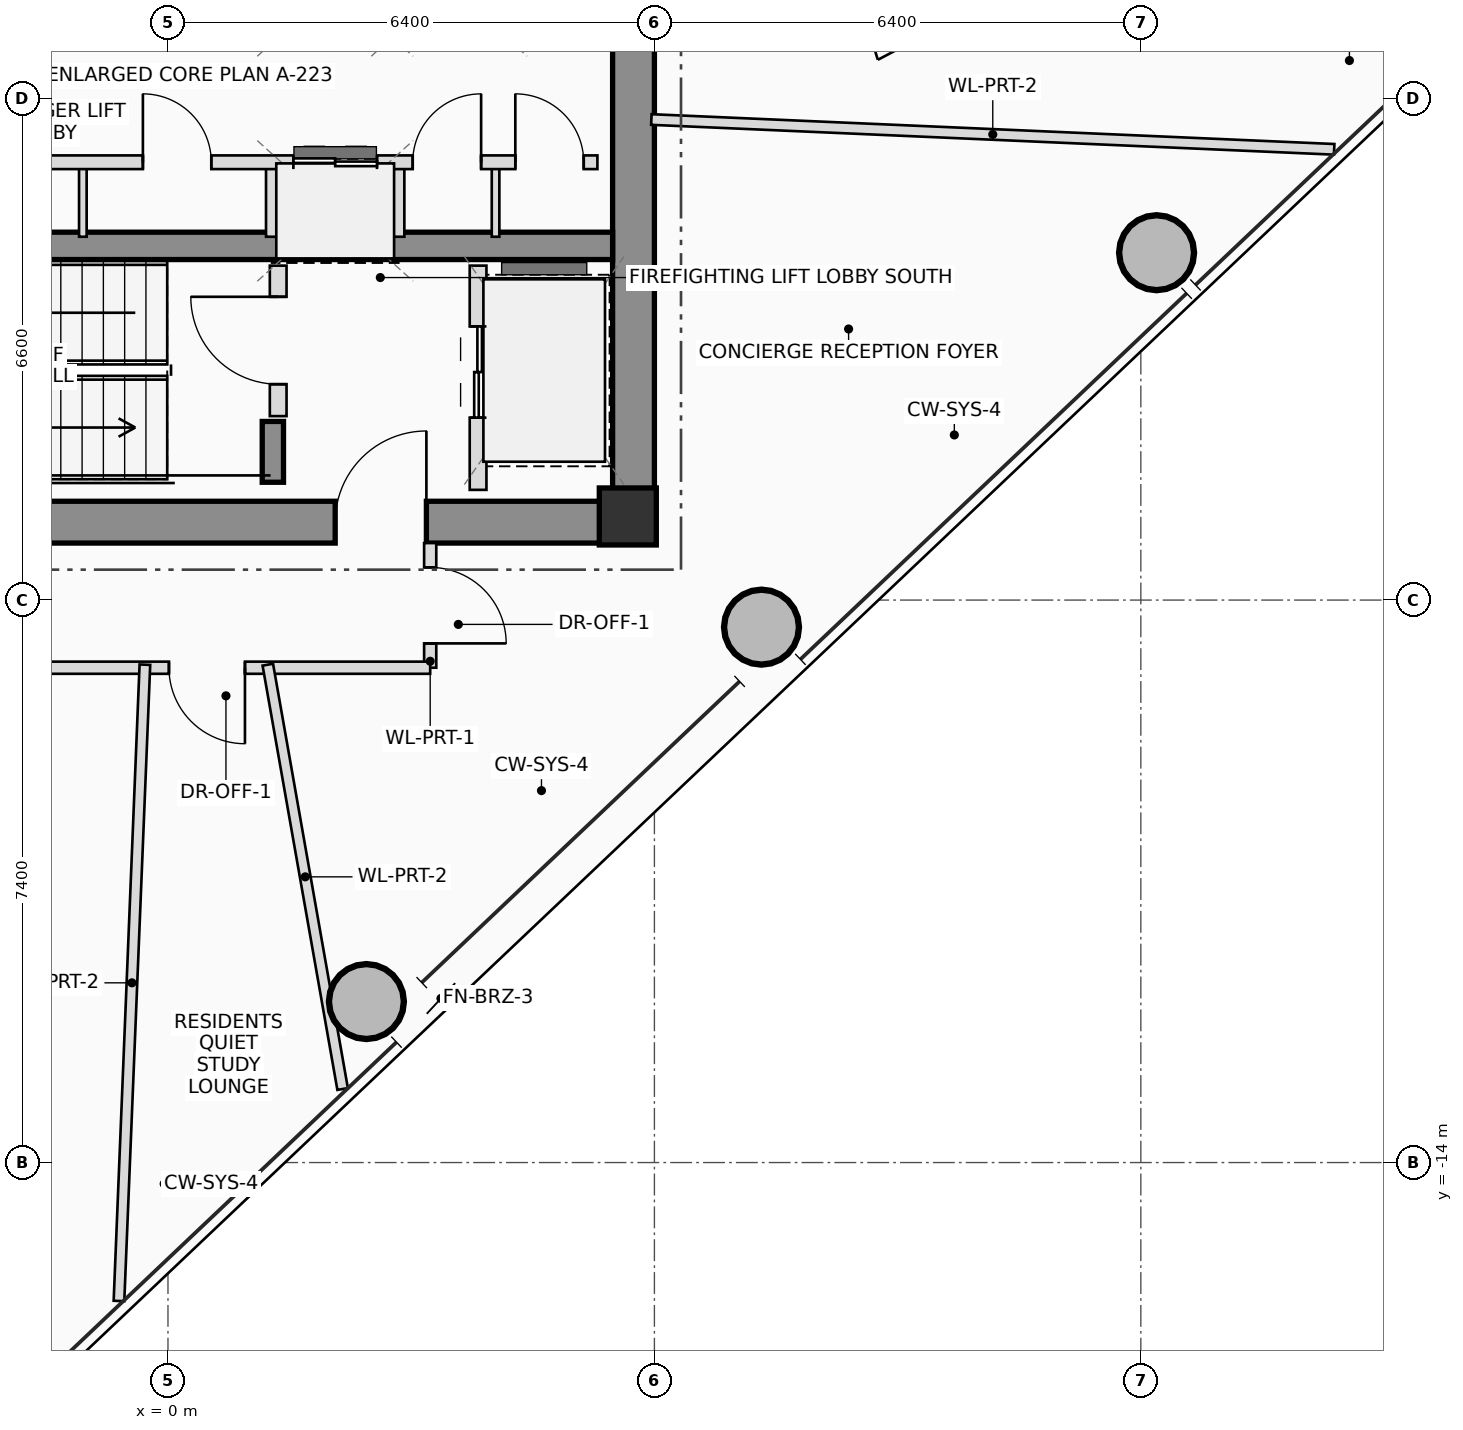
"""IFC4 building model, lengths in metres.
Left out: names, types, materials, properties, quantities, classifications, styles, units other than length and angle.
Written with IfcOpenShell. Run it as: python <this file> out.ifc"""

import sys

from ifc_helpers import new_model, si_unit, direction, frame, frame_2d, origin, origin_2d, place, context, subcontext, project, spatial, rectangle, hollow_circle, extrude, source, transform, mapped, element, fill, save


model = new_model("IFC4")
c1 = context("Model", 3, precision=1e-05, world=origin(), true_north=direction((0.0, 1.0)))
c2 = subcontext(c1, "Body", "Model", "MODEL_VIEW")
j1 = project(units=[si_unit("LENGTHUNIT", "METRE"), si_unit("PLANEANGLEUNIT", "RADIAN")], contexts=[c1])
p1 = place(None, origin())
s1 = spatial("IfcSite", under=j1, at=p1, CompositionType="ELEMENT")
p2 = place(p1, origin())
s2 = spatial("IfcBuilding", under=s1, at=p2, CompositionType="ELEMENT")
p3 = place(p2, frame((0.0, 0.0, 245.65)))
s3 = spatial("IfcBuildingStorey", under=s2, at=p3, CompositionType="ELEMENT", Elevation=245.65)
m1 = source(origin(), c2, "Body", "SweptSolid", [
    extrude(rectangle(XDim=0.75, YDim=0.75, at=origin_2d()), origin(), (0.0, 0.0, 1.0), 3.4),
])
p4 = place(p3, frame((6.05, -5.5, 0.0), z_axis=(0.0, 0.0, 1.0), x_axis=(1.0, 0.0, 0.0)))
e1 = element("IfcColumn", 1, at=p4, inside=s3, PredefinedType="COLUMN", context=c2, shape_type="MappedRepresentation", body=[
    mapped(m1, transform((0.0, 0.0, 0.0), scale=1.0)),
])
p5 = place(p3, frame((-6.4, -5.575, 0.0), z_axis=(0.0, 0.0, 1.0), x_axis=(1.0, 0.0, 0.0)))
e2 = element("IfcWall", 2, at=p5, inside=s3, PredefinedType="SHEAR", context=c2, shape_type="SweptSolid", body=[
    extrude(rectangle(XDim=12.8, YDim=0.55, at=frame_2d((6.4, 0.0))), origin(), (0.0, 0.0, 1.0), 3.4),
])
p6 = place(p5, frame((8.6, 0.0, 0.0)))
e3 = element("IfcOpeningElement", 3, at=p6, cuts=e2, PredefinedType="OPENING", context=c2, shape_type="SweptSolid", body=[
    extrude(rectangle(XDim=1.2, YDim=2.2, at=frame_2d((0.6, 1.1))), frame((0.0, 0.285, 0.0), z_axis=(0.0, -1.0, 0.0), x_axis=(1.0, 0.0, 0.0)), (0.0, 0.0, 1.0), 0.57),
])
p7 = place(p3, frame((6.125, -5.3, 0.0), z_axis=(0.0, 0.0, 1.0), x_axis=(0.0, 1.0, 0.0)))
e4 = element("IfcWall", 4, at=p7, inside=s3, PredefinedType="SHEAR", context=c2, shape_type="SweptSolid", body=[
    extrude(rectangle(XDim=10.6, YDim=0.55, at=frame_2d((5.3, 0.0))), origin(), (0.0, 0.0, 1.0), 3.4),
])
p8 = place(p3, frame((-5.85, -1.94, 0.0), z_axis=(0.0, 0.0, 1.0), x_axis=(1.0, 0.0, 0.0)))
e5 = element("IfcWall", 5, at=p8, inside=s3, PredefinedType="SHEAR", context=c2, shape_type="SweptSolid", body=[
    extrude(rectangle(XDim=11.7, YDim=0.36, at=frame_2d((5.85, 0.0))), origin(), (0.0, 0.0, 1.0), 3.4),
])
p9 = place(p3, frame((1.38, -5.05, 0.0), z_axis=(0.0, 0.0, 1.0), x_axis=(0.0, 1.0, 0.0)))
e6 = element("IfcWall", 6, at=p9, inside=s3, PredefinedType="SHEAR", context=c2, shape_type="SweptSolid", body=[
    extrude(rectangle(XDim=0.8, YDim=0.28, at=frame_2d((0.4, 0.0))), origin(), (0.0, 0.0, 1.0), 3.4),
])
m2 = source(origin(), c2, "Body", "SweptSolid", [
    extrude(hollow_circle(Radius=0.5, WallThickness=0.04, at=origin_2d()), origin(), (0.0, 0.0, 1.0), 3.4),
])
for number, where, z_axis, x_axis in (
    (7, (2.611, -11.882, 0.0), (0.0, 0.0, 1.0), (1.0, 0.0, 0.0)),
    (8, (7.809, -6.956, 0.0), (0.0, 0.0, 1.0), (1.0, 0.0, 0.0)),
    (9, (13.007, -2.03, 0.0), (0.0, 0.0, 1.0), (1.0, 0.0, 0.0)),
):
    element("IfcColumn", number, at=place(p3, frame(where, z_axis=z_axis, x_axis=x_axis)), inside=s3, PredefinedType="COLUMN", context=c2, shape_type="MappedRepresentation", body=[
        mapped(m2, transform((0.0, 0.0, 0.0), scale=1.0)),
    ])
p10 = place(p3, frame((1.45, -4.18, 0.0), z_axis=(0.0, 0.0, 1.0), x_axis=(0.0, 1.0, 0.0)))
e10 = element("IfcWall", 10, at=p10, inside=s3, PredefinedType="PLUMBINGWALL", context=c2, shape_type="SweptSolid", body=[
    extrude(rectangle(XDim=1.98, YDim=0.22, at=frame_2d((0.99, 0.0))), origin(), (0.0, 0.0, 1.0), 3.2),
])
p11 = place(p10, frame((0.42, 0.0, 0.0)))
e11 = element("IfcOpeningElement", 11, at=p11, cuts=e10, PredefinedType="OPENING", context=c2, shape_type="SweptSolid", body=[
    extrude(rectangle(XDim=1.15, YDim=2.15, at=frame_2d((0.575, 1.075))), frame((0.0, 0.12, 0.0), z_axis=(0.0, -1.0, 0.0), x_axis=(1.0, 0.0, 0.0)), (0.0, 0.0, 1.0), 0.24),
])
p12 = place(p3, frame((4.08, -5.15, 0.0), z_axis=(0.0, 0.0, 1.0), x_axis=(0.0, 1.0, 0.0)))
e12 = element("IfcWall", 12, at=p12, inside=s3, PredefinedType="PLUMBINGWALL", context=c2, shape_type="SweptSolid", body=[
    extrude(rectangle(XDim=2.95, YDim=0.22, at=frame_2d((1.475, 0.0))), origin(), (0.0, 0.0, 1.0), 3.2),
])
p13 = place(p12, frame((0.95, 0.0, 0.0)))
e13 = element("IfcOpeningElement", 13, at=p13, cuts=e12, PredefinedType="OPENING", context=c2, shape_type="SweptSolid", body=[
    extrude(rectangle(XDim=1.2, YDim=2.25, at=frame_2d((0.6, 1.125))), frame((0.0, 0.12, 0.0), z_axis=(0.0, -1.0, 0.0), x_axis=(1.0, 0.0, 0.0)), (0.0, 0.0, 1.0), 0.24),
])
p14 = place(p3, frame((-1.12, -1.82, 0.0), z_axis=(0.0, 0.0, 1.0), x_axis=(0.0, 1.0, 0.0)))
e14 = element("IfcWall", 14, at=p14, inside=s3, PredefinedType="PARTITIONING", context=c2, shape_type="SweptSolid", body=[
    extrude(rectangle(XDim=0.98, YDim=0.1, at=frame_2d((0.49, 0.0))), origin(), (0.0, 0.0, 1.0), 3.2),
])
for number, where, z_axis, x_axis in (
    (15, (1.38, -1.82, 0.0), (0.0, 0.0, 1.0), (0.0, 1.0, 0.0)),
    (16, (3.02, -1.82, 0.0), (0.0, 0.0, 1.0), (0.0, 1.0, 0.0)),
):
    element("IfcWall", number, at=place(p3, frame(where, z_axis=z_axis, x_axis=x_axis)), inside=s3, PredefinedType="PLUMBINGWALL", context=c2, shape_type="SweptSolid", body=[
        extrude(rectangle(XDim=0.98, YDim=0.18, at=frame_2d((0.49, 0.0))), origin(), (0.0, 0.0, 1.0), 3.2),
    ])
p15 = place(p3, frame((4.31, -1.82, 0.0), z_axis=(0.0, 0.0, 1.0), x_axis=(0.0, 1.0, 0.0)))
e17 = element("IfcWall", 17, at=p15, inside=s3, PredefinedType="PARTITIONING", context=c2, shape_type="SweptSolid", body=[
    extrude(rectangle(XDim=0.98, YDim=0.1, at=frame_2d((0.49, 0.0))), origin(), (0.0, 0.0, 1.0), 3.2),
])
p16 = place(p3, frame((-5.68, -0.84, 0.0), z_axis=(0.0, 0.0, 1.0), x_axis=(1.0, 0.0, 0.0)))
e18 = element("IfcWall", 18, at=p16, inside=s3, PredefinedType="PLUMBINGWALL", context=c2, shape_type="SweptSolid", body=[
    extrude(rectangle(XDim=11.33, YDim=0.18, at=frame_2d((5.665, 0.0))), origin(), (0.0, 0.0, 1.0), 3.2),
])
p17 = place(p16, frame((1.88, 0.0, 0.0)))
e19 = element("IfcOpeningElement", 19, at=p17, cuts=e18, PredefinedType="OPENING", context=c2, shape_type="SweptSolid", body=[
    extrude(rectangle(XDim=0.9, YDim=2.05, at=frame_2d((0.45, 1.025))), frame((0.0, 0.1, 0.0), z_axis=(0.0, -1.0, 0.0), x_axis=(1.0, 0.0, 0.0)), (0.0, 0.0, 1.0), 0.2),
])
p18 = place(p16, frame((5.35, 0.0, 0.0)))
e20 = element("IfcOpeningElement", 20, at=p18, cuts=e18, PredefinedType="OPENING", context=c2, shape_type="SweptSolid", body=[
    extrude(rectangle(XDim=0.9, YDim=2.05, at=frame_2d((0.45, 1.025))), frame((0.0, 0.1, 0.0), z_axis=(0.0, -1.0, 0.0), x_axis=(1.0, 0.0, 0.0)), (0.0, 0.0, 1.0), 0.2),
])
p19 = place(p16, frame((7.33, 0.0, 0.0)))
e21 = element("IfcOpeningElement", 21, at=p19, cuts=e18, PredefinedType="OPENING", context=c2, shape_type="SweptSolid", body=[
    extrude(rectangle(XDim=1.1, YDim=2.2, at=frame_2d((0.55, 1.1))), frame((0.0, 0.1, 0.0), z_axis=(0.0, -1.0, 0.0), x_axis=(1.0, 0.0, 0.0)), (0.0, 0.0, 1.0), 0.2),
])
p20 = place(p16, frame((8.9, 0.0, 0.0)))
e22 = element("IfcOpeningElement", 22, at=p20, cuts=e18, PredefinedType="OPENING", context=c2, shape_type="SweptSolid", body=[
    extrude(rectangle(XDim=0.9, YDim=2.05, at=frame_2d((0.45, 1.025))), frame((0.0, 0.1, 0.0), z_axis=(0.0, -1.0, 0.0), x_axis=(1.0, 0.0, 0.0)), (0.0, 0.0, 1.0), 0.2),
])
p21 = place(p16, frame((10.25, 0.0, 0.0)))
e23 = element("IfcOpeningElement", 23, at=p21, cuts=e18, PredefinedType="OPENING", context=c2, shape_type="SweptSolid", body=[
    extrude(rectangle(XDim=0.9, YDim=2.05, at=frame_2d((0.45, 1.025))), frame((0.0, 0.1, 0.0), z_axis=(0.0, -1.0, 0.0), x_axis=(1.0, 0.0, 0.0)), (0.0, 0.0, 1.0), 0.2),
])
p22 = place(p3, frame((3.45, -5.85, 0.0), z_axis=(0.0, 0.0, 1.0), x_axis=(0.0, -1.0, 0.0)))
e24 = element("IfcWall", 24, at=p22, inside=s3, PredefinedType="PARTITIONING", context=c2, shape_type="SweptSolid", body=[
    extrude(rectangle(XDim=1.64, YDim=0.16, at=frame_2d((0.82, 0.0))), origin(), (0.0, 0.0, 1.0), 3.2),
])
p23 = place(p22, frame((0.32, 0.0, 0.0)))
e25 = element("IfcOpeningElement", 25, at=p23, cuts=e24, PredefinedType="OPENING", context=c2, shape_type="SweptSolid", body=[
    extrude(rectangle(XDim=1.0, YDim=2.25, at=frame_2d((0.5, 1.125))), frame((0.0, 0.09, 0.0), z_axis=(0.0, -1.0, 0.0), x_axis=(1.0, 0.0, 0.0)), (0.0, 0.0, 1.0), 0.18),
])
p24 = place(p3, frame((3.45, -7.49, 0.0), z_axis=(0.0, 0.0, 1.0), x_axis=(-1.0, 0.0, 0.0)))
e26 = element("IfcWall", 26, at=p24, inside=s3, PredefinedType="PARTITIONING", context=c2, shape_type="SweptSolid", body=[
    extrude(rectangle(XDim=9.81, YDim=0.16, at=frame_2d((4.905, 0.0))), origin(), (0.0, 0.0, 1.0), 2.605),
])
p25 = place(p24, frame((2.437, 0.0, 0.0)))
e27 = element("IfcOpeningElement", 27, at=p25, cuts=e26, PredefinedType="OPENING", context=c2, shape_type="SweptSolid", body=[
    extrude(rectangle(XDim=1.0, YDim=2.25, at=frame_2d((0.5, 1.125))), frame((0.0, 0.09, 0.0), z_axis=(0.0, -1.0, 0.0), x_axis=(1.0, 0.0, 0.0)), (0.0, 0.0, 1.0), 0.18),
])
p26 = place(p24, frame((6.135, 0.0, 0.0)))
e28 = element("IfcOpeningElement", 28, at=p26, cuts=e26, PredefinedType="OPENING", context=c2, shape_type="SweptSolid", body=[
    extrude(rectangle(XDim=1.0, YDim=2.25, at=frame_2d((0.5, 1.125))), frame((0.0, 0.09, 0.0), z_axis=(0.0, -1.0, 0.0), x_axis=(1.0, 0.0, 0.0)), (0.0, 0.0, 1.0), 0.18),
])
p27 = place(p3, frame((6.36, -0.278, 0.0), z_axis=(0.0, 0.0, 1.0), x_axis=(0.99904773846, -0.043630451279, 0.0)))
e29 = element("IfcWall", 29, at=p27, inside=s3, PredefinedType="PARTITIONING", context=c2, shape_type="SweptSolid", body=[
    extrude(rectangle(XDim=8.992, YDim=0.14, at=frame_2d((4.496, 0.0))), origin(), (0.0, 0.0, 1.0), 2.605),
])
p28 = place(p3, frame((-0.304, -7.45, 0.0), z_axis=(0.0, 0.0, 1.0), x_axis=(-0.04070934235, -0.999171031128, 0.0)))
e30 = element("IfcWall", 30, at=p28, inside=s3, PredefinedType="PARTITIONING", context=c2, shape_type="SweptSolid", body=[
    extrude(rectangle(XDim=8.378, YDim=0.14, at=frame_2d((4.189, 0.0))), origin(), (0.0, 0.0, 1.0), 2.765),
])
p29 = place(p3, frame((1.314, -7.45, 0.0), z_axis=(0.0, 0.0, 1.0), x_axis=(0.173652657872, -0.984806963021, 0.0)))
e31 = element("IfcWall", 31, at=p29, inside=s3, PredefinedType="PARTITIONING", context=c2, shape_type="SweptSolid", body=[
    extrude(rectangle(XDim=5.669, YDim=0.14, at=frame_2d((2.834, 0.0))), origin(), (0.0, 0.0, 1.0), 2.765),
])
p30 = place(p6, origin())
e32 = element("IfcDoor", 32, at=p30, inside=s3, OperationType="SINGLE_SWING_RIGHT", PredefinedType="DOOR", context=c2, shape_type="SweptSolid", body=[
    extrude(rectangle(XDim=1.2, YDim=2.2, at=frame_2d((0.6, 1.1))), frame((0.0, 0.025, 0.0), z_axis=(0.0, -1.0, 0.0), x_axis=(1.0, 0.0, 0.0)), (0.0, 0.0, 1.0), 0.05),
])
fill(e3, e32)
p31 = place(p11, origin())
e33 = element("IfcDoor", 33, at=p31, inside=s3, OperationType="SINGLE_SWING_RIGHT", PredefinedType="DOOR", context=c2, shape_type="SweptSolid", body=[
    extrude(rectangle(XDim=1.15, YDim=2.15, at=frame_2d((0.575, 1.075))), frame((0.0, 0.025, 0.0), z_axis=(0.0, -1.0, 0.0), x_axis=(1.0, 0.0, 0.0)), (0.0, 0.0, 1.0), 0.05),
])
fill(e11, e33)
p32 = place(p13, origin())
e34 = element("IfcDoor", 34, at=p32, inside=s3, OperationType="DOUBLE_DOOR_SLIDING", PredefinedType="DOOR", context=c2, shape_type="SweptSolid", body=[
    extrude(rectangle(XDim=1.2, YDim=2.25, at=frame_2d((0.6, 1.125))), frame((0.0, 0.025, 0.0), z_axis=(0.0, -1.0, 0.0), x_axis=(1.0, 0.0, 0.0)), (0.0, 0.0, 1.0), 0.05),
])
fill(e13, e34)
p33 = place(p18, origin())
e35 = element("IfcDoor", 35, at=p33, inside=s3, OperationType="SINGLE_SWING_LEFT", PredefinedType="DOOR", context=c2, shape_type="SweptSolid", body=[
    extrude(rectangle(XDim=0.9, YDim=2.05, at=frame_2d((0.45, 1.025))), frame((0.0, 0.025, 0.0), z_axis=(0.0, -1.0, 0.0), x_axis=(1.0, 0.0, 0.0)), (0.0, 0.0, 1.0), 0.05),
])
fill(e20, e35)
p34 = place(p19, origin())
e36 = element("IfcDoor", 36, at=p34, inside=s3, OperationType="DOUBLE_DOOR_SLIDING", PredefinedType="DOOR", context=c2, shape_type="SweptSolid", body=[
    extrude(rectangle(XDim=1.1, YDim=2.2, at=frame_2d((0.55, 1.1))), frame((0.0, 0.025, 0.0), z_axis=(0.0, -1.0, 0.0), x_axis=(1.0, 0.0, 0.0)), (0.0, 0.0, 1.0), 0.05),
])
fill(e21, e36)
p35 = place(p20, origin())
e37 = element("IfcDoor", 37, at=p35, inside=s3, OperationType="SINGLE_SWING_RIGHT", PredefinedType="DOOR", context=c2, shape_type="SweptSolid", body=[
    extrude(rectangle(XDim=0.9, YDim=2.05, at=frame_2d((0.45, 1.025))), frame((0.0, 0.025, 0.0), z_axis=(0.0, -1.0, 0.0), x_axis=(1.0, 0.0, 0.0)), (0.0, 0.0, 1.0), 0.05),
])
fill(e22, e37)
p36 = place(p21, origin())
e38 = element("IfcDoor", 38, at=p36, inside=s3, OperationType="SINGLE_SWING_LEFT", PredefinedType="DOOR", context=c2, shape_type="SweptSolid", body=[
    extrude(rectangle(XDim=0.9, YDim=2.05, at=frame_2d((0.45, 1.025))), frame((0.0, 0.025, 0.0), z_axis=(0.0, -1.0, 0.0), x_axis=(1.0, 0.0, 0.0)), (0.0, 0.0, 1.0), 0.05),
])
fill(e23, e38)
p37 = place(p23, origin())
e39 = element("IfcDoor", 39, at=p37, inside=s3, OperationType="SINGLE_SWING_RIGHT", PredefinedType="DOOR", context=c2, shape_type="SweptSolid", body=[
    extrude(rectangle(XDim=1.0, YDim=2.25, at=frame_2d((0.5, 1.125))), frame((0.0, 0.025, 0.0), z_axis=(0.0, -1.0, 0.0), x_axis=(1.0, 0.0, 0.0)), (0.0, 0.0, 1.0), 0.05),
])
fill(e25, e39)
p38 = place(p25, origin())
e40 = element("IfcDoor", 40, at=p38, inside=s3, OperationType="SINGLE_SWING_LEFT", PredefinedType="DOOR", context=c2, shape_type="SweptSolid", body=[
    extrude(rectangle(XDim=1.0, YDim=2.25, at=frame_2d((0.5, 1.125))), frame((0.0, 0.025, 0.0), z_axis=(0.0, -1.0, 0.0), x_axis=(1.0, 0.0, 0.0)), (0.0, 0.0, 1.0), 0.05),
])
fill(e27, e40)
save(model, sys.argv[1])
